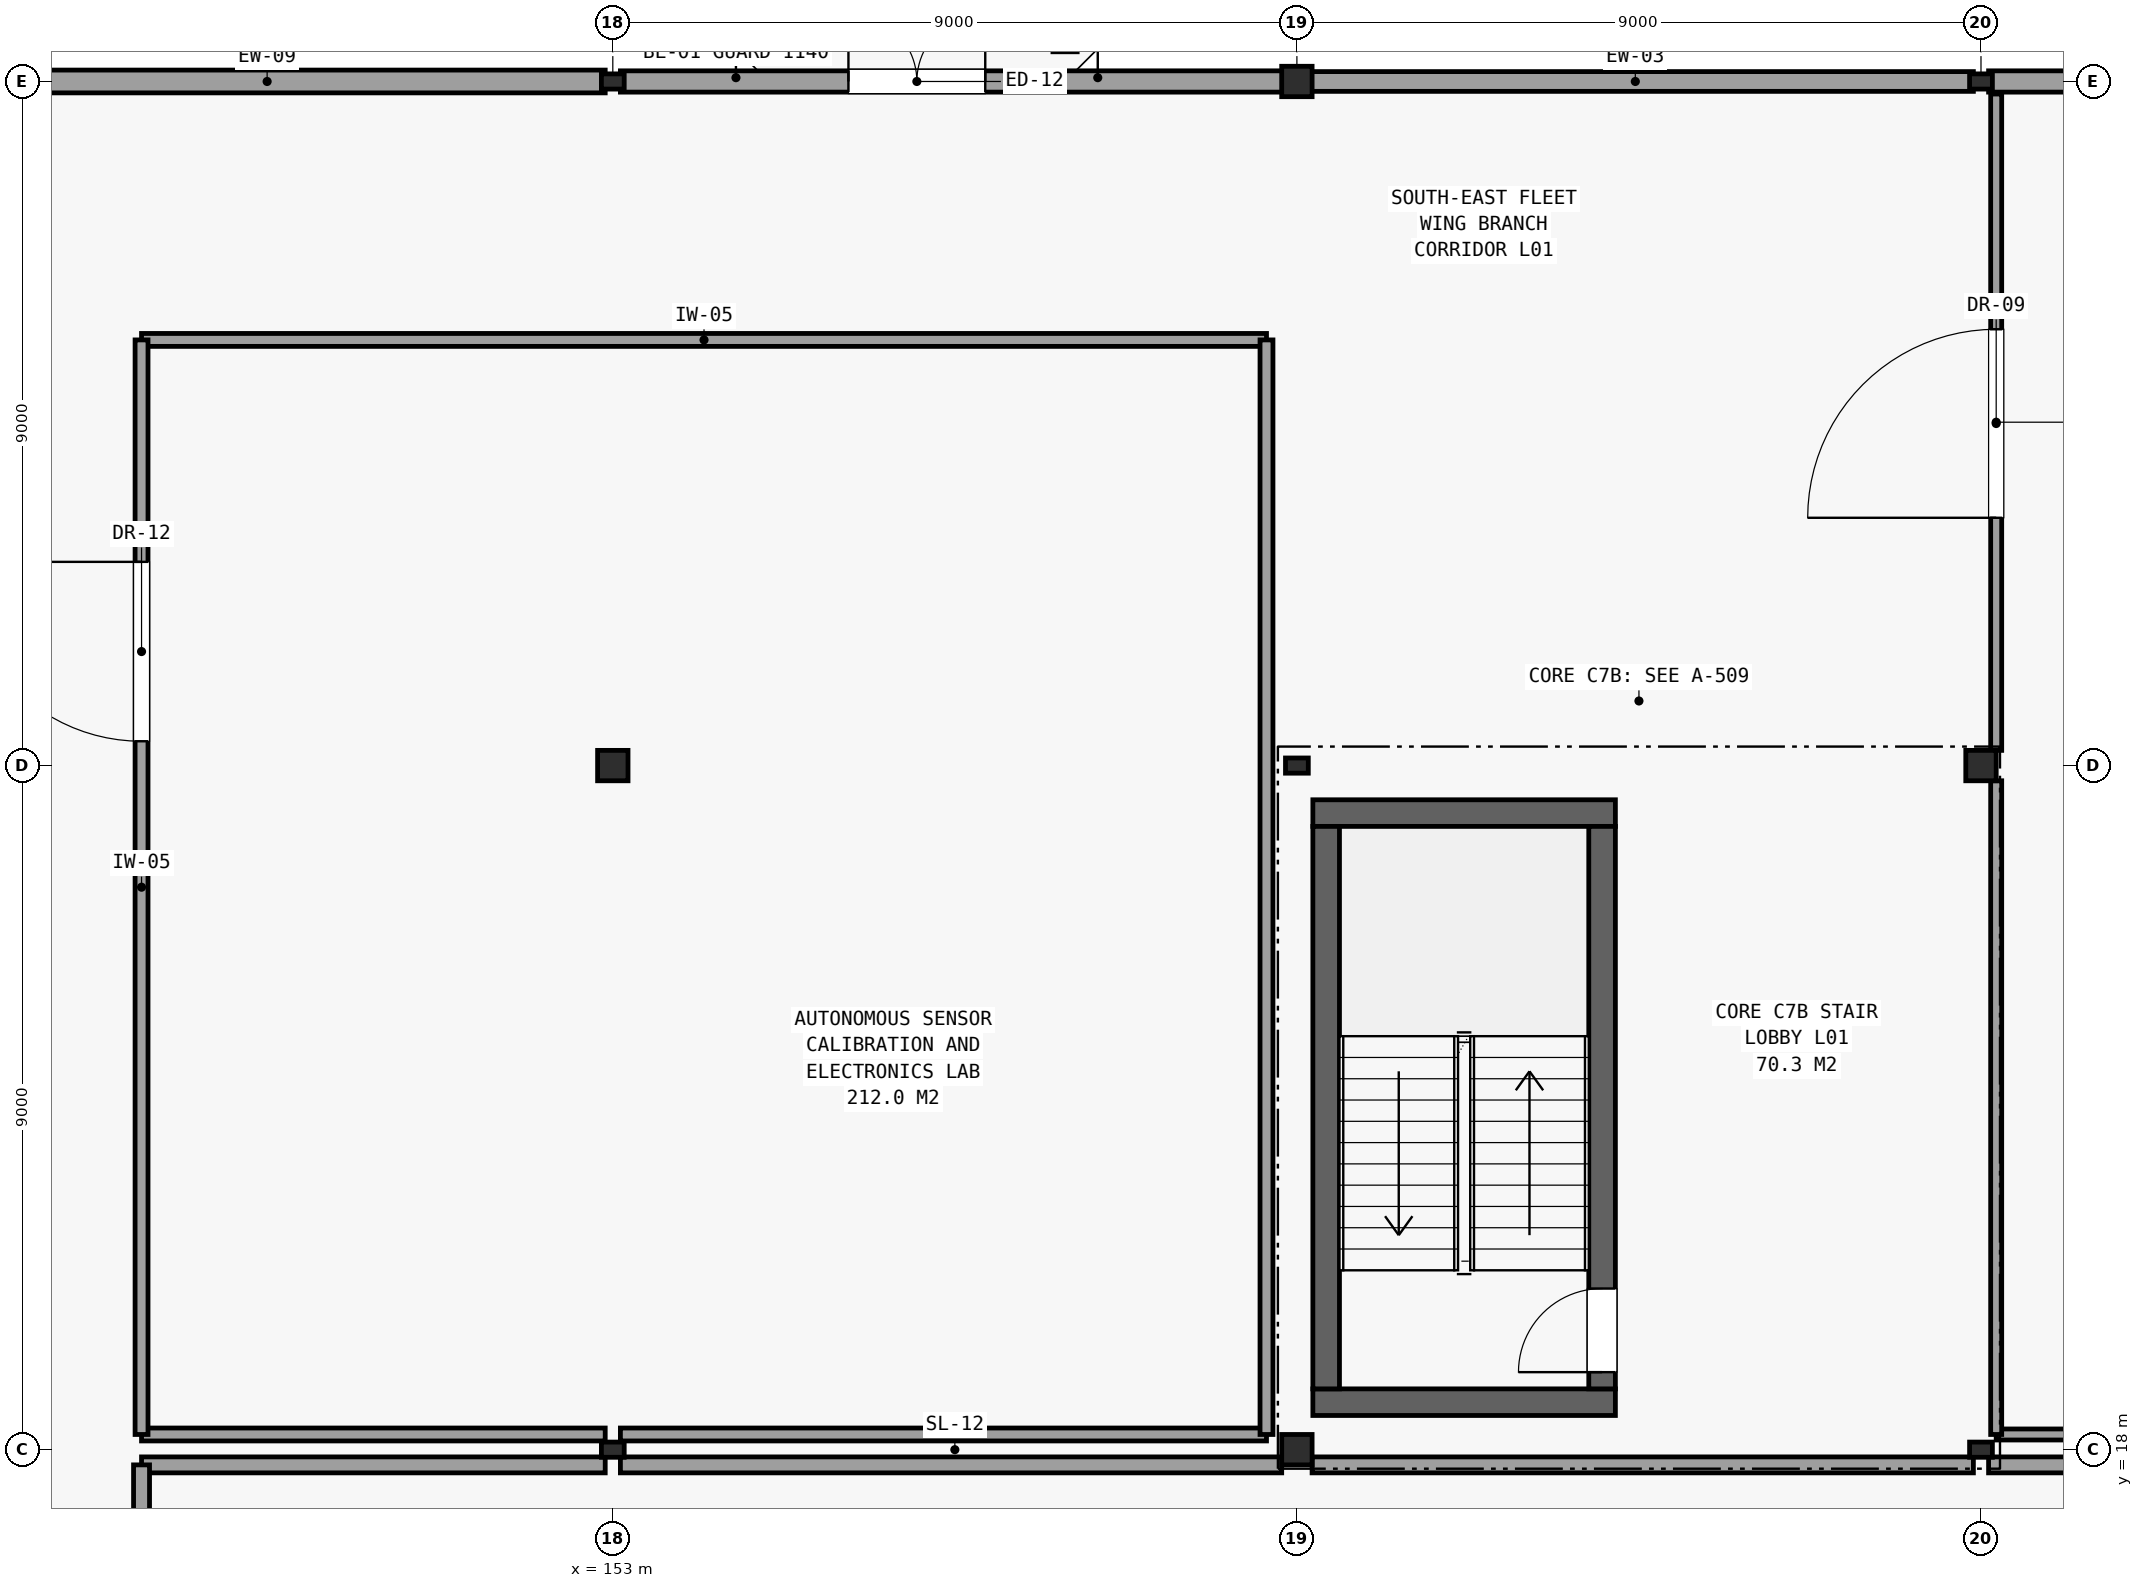
"""IFC4 building model, lengths in metres.
Left out: names, types, materials, properties, quantities, classifications, styles, units other than length and angle.
Written with IfcOpenShell. Run it as: python <this file> out.ifc"""

import sys

from ifc_helpers import new_model, si_unit, direction, frame, frame_2d, origin, origin_2d, place, context, subcontext, project, spatial, rectangle, hollow_rectangle, i_section, extrude, element, fill, save


model = new_model("IFC4")
c1 = context("Model", 3, precision=1e-05, world=origin(), true_north=direction((0.0, 1.0)))
c2 = subcontext(c1, "Body", "Model", "MODEL_VIEW")
j1 = project(units=[si_unit("LENGTHUNIT", "METRE"), si_unit("PLANEANGLEUNIT", "RADIAN")], contexts=[c1])
p1 = place(None, origin())
s1 = spatial("IfcSite", under=j1, at=p1, CompositionType="ELEMENT")
p2 = place(p1, origin())
s2 = spatial("IfcBuilding", under=s1, at=p2, CompositionType="ELEMENT")
p3 = place(p2, frame((0.0, 0.0, 5.1)))
s3 = spatial("IfcBuildingStorey", under=s2, at=p3, CompositionType="ELEMENT", Elevation=5.1)
p4 = place(p3, frame((153.0, 18.0, 0.0), z_axis=(0.0, 0.0, 1.0), x_axis=(1.0, 0.0, 0.0)))
e1 = element("IfcColumn", 1, at=p4, inside=s3, PredefinedType="COLUMN", context=c2, shape_type="SweptSolid", body=[
    extrude(hollow_rectangle(XDim=0.2, YDim=0.3, WallThickness=0.012, at=origin_2d()), origin(), (0.0, 0.0, 1.0), 4.2),
])
p5 = place(p3, frame((153.0, 27.0, 0.0), z_axis=(0.0, 0.0, 1.0), x_axis=(1.0, 0.0, 0.0)))
e2 = element("IfcColumn", 2, at=p5, inside=s3, PredefinedType="COLUMN", context=c2, shape_type="SweptSolid", body=[
    extrude(i_section(OverallWidth=0.4, OverallDepth=0.4, WebThickness=0.013, FlangeThickness=0.021, FilletRadius=0.016, at=origin_2d()), origin(), (0.0, 0.0, 1.0), 4.2),
])
p6 = place(p3, frame((153.0, 36.0, 0.0), z_axis=(0.0, 0.0, 1.0), x_axis=(1.0, 0.0, 0.0)))
e3 = element("IfcColumn", 3, at=p6, inside=s3, PredefinedType="COLUMN", context=c2, shape_type="SweptSolid", body=[
    extrude(hollow_rectangle(XDim=0.2, YDim=0.3, WallThickness=0.012, at=origin_2d()), origin(), (0.0, 0.0, 1.0), 4.2),
])
p7 = place(p3, frame((162.0, 18.0, 0.0), z_axis=(0.0, 0.0, 1.0), x_axis=(1.0, 0.0, 0.0)))
e4 = element("IfcColumn", 4, at=p7, inside=s3, PredefinedType="COLUMN", context=c2, shape_type="SweptSolid", body=[
    extrude(i_section(OverallWidth=0.4, OverallDepth=0.4, WebThickness=0.013, FlangeThickness=0.021, FilletRadius=0.016, at=origin_2d()), origin(), (0.0, 0.0, 1.0), 4.2),
])
p8 = place(p3, frame((162.0, 27.0, 0.0), z_axis=(0.0, 0.0, 1.0), x_axis=(1.0, 0.0, 0.0)))
e5 = element("IfcColumn", 5, at=p8, inside=s3, PredefinedType="COLUMN", context=c2, shape_type="SweptSolid", body=[
    extrude(hollow_rectangle(XDim=0.2, YDim=0.3, WallThickness=0.012, at=origin_2d()), origin(), (0.0, 0.0, 1.0), 4.2),
])
p9 = place(p3, frame((162.0, 36.0, 0.0), z_axis=(0.0, 0.0, 1.0), x_axis=(1.0, 0.0, 0.0)))
e6 = element("IfcColumn", 6, at=p9, inside=s3, PredefinedType="COLUMN", context=c2, shape_type="SweptSolid", body=[
    extrude(i_section(OverallWidth=0.4, OverallDepth=0.4, WebThickness=0.013, FlangeThickness=0.021, FilletRadius=0.016, at=origin_2d()), origin(), (0.0, 0.0, 1.0), 4.2),
])
p10 = place(p3, frame((171.0, 18.0, 0.0), z_axis=(0.0, 0.0, 1.0), x_axis=(1.0, 0.0, 0.0)))
e7 = element("IfcColumn", 7, at=p10, inside=s3, PredefinedType="COLUMN", context=c2, shape_type="SweptSolid", body=[
    extrude(hollow_rectangle(XDim=0.2, YDim=0.3, WallThickness=0.012, at=origin_2d()), origin(), (0.0, 0.0, 1.0), 4.2),
])
p11 = place(p3, frame((171.0, 27.0, 0.0), z_axis=(0.0, 0.0, 1.0), x_axis=(1.0, 0.0, 0.0)))
e8 = element("IfcColumn", 8, at=p11, inside=s3, PredefinedType="COLUMN", context=c2, shape_type="SweptSolid", body=[
    extrude(i_section(OverallWidth=0.4, OverallDepth=0.4, WebThickness=0.013, FlangeThickness=0.021, FilletRadius=0.016, at=origin_2d()), origin(), (0.0, 0.0, 1.0), 4.2),
])
p12 = place(p3, frame((171.0, 36.0, 0.0), z_axis=(0.0, 0.0, 1.0), x_axis=(1.0, 0.0, 0.0)))
e9 = element("IfcColumn", 9, at=p12, inside=s3, PredefinedType="COLUMN", context=c2, shape_type="SweptSolid", body=[
    extrude(hollow_rectangle(XDim=0.2, YDim=0.3, WallThickness=0.012, at=origin_2d()), origin(), (0.0, 0.0, 1.0), 4.2),
])
p13 = place(p3, frame((179.9, 36.0, 0.0), z_axis=(0.0, 0.0, 1.0), x_axis=(-1.0, 0.0, 0.0)))
e10 = element("IfcWall", 10, at=p13, inside=s3, PredefinedType="SOLIDWALL", context=c2, shape_type="SweptSolid", body=[
    extrude(rectangle(XDim=8.8, YDim=0.28, at=frame_2d((4.4, 0.0))), origin(), (0.0, 0.0, 1.0), 3.3),
])
p14 = place(p3, frame((170.9, 36.0, 0.0), z_axis=(0.0, 0.0, 1.0), x_axis=(-1.0, 0.0, 0.0)))
e11 = element("IfcWall", 11, at=p14, inside=s3, PredefinedType="SOLIDWALL", context=c2, shape_type="SweptSolid", body=[
    extrude(rectangle(XDim=8.896, YDim=0.26, at=frame_2d((4.448, 0.0))), origin(), (0.0, 0.0, 1.0), 3.3),
])
p15 = place(p3, frame((161.996, 36.0, 0.0), z_axis=(0.0, 0.0, 1.0), x_axis=(-1.0, 0.0, 0.0)))
e12 = element("IfcWall", 12, at=p15, inside=s3, PredefinedType="SOLIDWALL", context=c2, shape_type="SweptSolid", body=[
    extrude(rectangle(XDim=8.896, YDim=0.28, at=frame_2d((4.448, 0.0))), origin(), (0.0, 0.0, 1.0), 3.3),
])
p16 = place(p15, frame((5.896, 0.0, 0.0), z_axis=(0.0, 0.0, 1.0), x_axis=(-1.0, 0.0, 0.0)))
e13 = element("IfcOpeningElement", 13, at=p16, cuts=e12, PredefinedType="OPENING", context=c2, shape_type="SweptSolid", body=[
    extrude(rectangle(XDim=1.8, YDim=2.2, at=frame_2d((0.9, 1.1))), frame((0.0, 0.151, 0.0), z_axis=(0.0, -1.0, 0.0), x_axis=(1.0, 0.0, 0.0)), (0.0, 0.0, 1.0), 0.302),
])
p17 = place(p3, frame((152.9, 36.0, 0.0), z_axis=(0.0, 0.0, 1.0), x_axis=(-1.0, 0.0, 0.0)))
e14 = element("IfcWall", 14, at=p17, inside=s3, PredefinedType="SOLIDWALL", context=c2, shape_type="SweptSolid", body=[
    extrude(rectangle(XDim=8.896, YDim=0.3, at=frame_2d((4.448, 0.0))), origin(), (0.0, 0.0, 1.0), 3.3),
])
for number, where, z_axis, x_axis in (
    (15, (162.21, 18.625, 0.0), (0.0, 0.0, 1.0), (1.0, 0.0, 0.0)),
    (16, (162.21, 26.375, 0.0), (0.0, 0.0, 1.0), (1.0, 0.0, 0.0)),
):
    element("IfcWall", number, at=place(p3, frame(where, z_axis=z_axis, x_axis=x_axis)), inside=s3, PredefinedType="SHEAR", context=c2, shape_type="SweptSolid", body=[
        extrude(rectangle(XDim=3.98, YDim=0.35, at=frame_2d((1.99, 0.0))), origin(), (0.0, 0.0, 1.0), 3.95),
    ])
p18 = place(p3, frame((162.385, 18.8, 0.0), z_axis=(0.0, 0.0, 1.0), x_axis=(0.0, 1.0, 0.0)))
e17 = element("IfcWall", 17, at=p18, inside=s3, PredefinedType="SHEAR", context=c2, shape_type="SweptSolid", body=[
    extrude(rectangle(XDim=7.4, YDim=0.35, at=frame_2d((3.7, 0.0))), origin(), (0.0, 0.0, 1.0), 3.95),
])
p19 = place(p3, frame((166.015, 18.8, 0.0), z_axis=(0.0, 0.0, 1.0), x_axis=(0.0, 1.0, 0.0)))
e18 = element("IfcWall", 18, at=p19, inside=s3, PredefinedType="SHEAR", context=c2, shape_type="SweptSolid", body=[
    extrude(rectangle(XDim=7.4, YDim=0.35, at=frame_2d((3.7, 0.0))), origin(), (0.0, 0.0, 1.0), 3.95),
])
p20 = place(p19, frame((0.22, 0.0, 0.0)))
e19 = element("IfcOpeningElement", 19, at=p20, cuts=e18, PredefinedType="OPENING", context=c2, shape_type="SweptSolid", body=[
    extrude(rectangle(XDim=1.1, YDim=2.15, at=frame_2d((0.55, 1.075))), frame((0.0, 0.186, 0.0), z_axis=(0.0, -1.0, 0.0), x_axis=(1.0, 0.0, 0.0)), (0.0, 0.0, 1.0), 0.372),
])
p21 = place(p3, frame((146.8, 18.2, 0.0), z_axis=(0.0, 0.0, 1.0), x_axis=(1.0, 0.0, 0.0)))
e20 = element("IfcWall", 20, at=p21, inside=s3, PredefinedType="PARTITIONING", context=c2, shape_type="SweptSolid", body=[
    extrude(rectangle(XDim=6.1, YDim=0.17, at=frame_2d((3.05, 0.0))), origin(), (0.0, 0.0, 1.0), 3.3),
])
p22 = place(p3, frame((153.1, 18.2, 0.0), z_axis=(0.0, 0.0, 1.0), x_axis=(1.0, 0.0, 0.0)))
e21 = element("IfcWall", 21, at=p22, inside=s3, PredefinedType="PARTITIONING", context=c2, shape_type="SweptSolid", body=[
    extrude(rectangle(XDim=8.5, YDim=0.17, at=frame_2d((4.25, 0.0))), origin(), (0.0, 0.0, 1.0), 3.3),
])
p23 = place(p3, frame((146.8, 32.6, 0.0), z_axis=(0.0, 0.0, 1.0), x_axis=(1.0, 0.0, 0.0)))
e22 = element("IfcWall", 22, at=p23, inside=s3, PredefinedType="PARTITIONING", context=c2, shape_type="SweptSolid", body=[
    extrude(rectangle(XDim=14.8, YDim=0.17, at=frame_2d((7.4, 0.0))), origin(), (0.0, 0.0, 1.0), 3.3),
])
p24 = place(p3, frame((146.8, 18.2, 0.0), z_axis=(0.0, 0.0, 1.0), x_axis=(0.0, 1.0, 0.0)))
e23 = element("IfcWall", 23, at=p24, inside=s3, PredefinedType="PARTITIONING", context=c2, shape_type="SweptSolid", body=[
    extrude(rectangle(XDim=14.4, YDim=0.17, at=frame_2d((7.2, 0.0))), origin(), (0.0, 0.0, 1.0), 3.35),
])
p25 = place(p24, frame((9.12, 0.0, 0.0)))
e24 = element("IfcOpeningElement", 24, at=p25, cuts=e23, PredefinedType="OPENING", context=c2, shape_type="SweptSolid", body=[
    extrude(rectangle(XDim=2.36, YDim=2.879, at=frame_2d((1.18, 1.439))), frame((0.0, 0.096, 0.0), z_axis=(0.0, -1.0, 0.0), x_axis=(1.0, 0.0, 0.0)), (0.0, 0.0, 1.0), 0.192),
])
p26 = place(p3, frame((161.6, 18.2, 0.0), z_axis=(0.0, 0.0, 1.0), x_axis=(0.0, 1.0, 0.0)))
e25 = element("IfcWall", 25, at=p26, inside=s3, PredefinedType="PARTITIONING", context=c2, shape_type="SweptSolid", body=[
    extrude(rectangle(XDim=14.4, YDim=0.17, at=frame_2d((7.2, 0.0))), origin(), (0.0, 0.0, 1.0), 3.35),
])
p27 = place(p3, frame((171.2, 18.2, 0.0), z_axis=(0.0, 0.0, 1.0), x_axis=(1.0, 0.0, 0.0)))
e26 = element("IfcWall", 26, at=p27, inside=s3, PredefinedType="PARTITIONING", context=c2, shape_type="SweptSolid", body=[
    extrude(rectangle(XDim=8.635, YDim=0.145, at=frame_2d((4.317, 0.0))), origin(), (0.0, 0.0, 1.0), 3.29),
])
p28 = place(p3, frame((171.2, 18.2, 0.0), z_axis=(0.0, 0.0, 1.0), x_axis=(0.0, 1.0, 0.0)))
e27 = element("IfcWall", 27, at=p28, inside=s3, PredefinedType="PARTITIONING", context=c2, shape_type="SweptSolid", body=[
    extrude(rectangle(XDim=8.6, YDim=0.145, at=frame_2d((4.3, 0.0))), origin(), (0.0, 0.0, 1.0), 3.3),
])
p29 = place(p3, frame((171.2, 27.2, 0.0), z_axis=(0.0, 0.0, 1.0), x_axis=(0.0, 1.0, 0.0)))
e28 = element("IfcWall", 28, at=p29, inside=s3, PredefinedType="PARTITIONING", context=c2, shape_type="SweptSolid", body=[
    extrude(rectangle(XDim=8.635, YDim=0.145, at=frame_2d((4.317, 0.0))), origin(), (0.0, 0.0, 1.0), 3.3),
])
p30 = place(p29, frame((3.06, 0.0, 0.0)))
e29 = element("IfcOpeningElement", 29, at=p30, cuts=e28, PredefinedType="OPENING", context=c2, shape_type="SweptSolid", body=[
    extrude(rectangle(XDim=2.48, YDim=3.026, at=frame_2d((1.24, 1.513))), frame((0.0, 0.083, 0.0), z_axis=(0.0, -1.0, 0.0), x_axis=(1.0, 0.0, 0.0)), (0.0, 0.0, 1.0), 0.167),
])
p31 = place(p3, frame((146.8, 17.8, 0.0), z_axis=(0.0, 0.0, 1.0), x_axis=(1.0, 0.0, 0.0)))
e30 = element("IfcWall", 30, at=p31, inside=s3, PredefinedType="PARTITIONING", context=c2, shape_type="SweptSolid", body=[
    extrude(rectangle(XDim=6.1, YDim=0.21, at=frame_2d((3.05, 0.0))), origin(), (0.0, 0.0, 1.0), 3.29),
])
for number, where, z_axis, x_axis in (
    (31, (153.1, 17.8, 0.0), (0.0, 0.0, 1.0), (1.0, 0.0, 0.0)),
    (32, (162.2, 17.8, 0.0), (0.0, 0.0, 1.0), (1.0, 0.0, 0.0)),
):
    element("IfcWall", number, at=place(p3, frame(where, z_axis=z_axis, x_axis=x_axis)), inside=s3, PredefinedType="PARTITIONING", context=c2, shape_type="SweptSolid", body=[
        extrude(rectangle(XDim=8.7, YDim=0.21, at=frame_2d((4.35, 0.0))), origin(), (0.0, 0.0, 1.0), 3.29),
    ])
p32 = place(p3, frame((171.1, 17.8, 0.0), z_axis=(0.0, 0.0, 1.0), x_axis=(1.0, 0.0, 0.0)))
e33 = element("IfcWall", 33, at=p32, inside=s3, PredefinedType="PARTITIONING", context=c2, shape_type="SweptSolid", body=[
    extrude(rectangle(XDim=8.735, YDim=0.21, at=frame_2d((4.367, 0.0))), origin(), (0.0, 0.0, 1.0), 3.29),
])
p33 = place(p3, frame((146.8, 0.165, 0.0), z_axis=(0.0, 0.0, 1.0), x_axis=(0.0, 1.0, 0.0)))
e34 = element("IfcWall", 34, at=p33, inside=s3, PredefinedType="PARTITIONING", context=c2, shape_type="SweptSolid", body=[
    extrude(rectangle(XDim=17.635, YDim=0.21, at=frame_2d((8.817, 0.0))), origin(), (0.0, 0.0, 1.0), 3.34),
])
p34 = place(p33, frame((12.535, 0.0, 0.0)))
e35 = element("IfcOpeningElement", 35, at=p34, cuts=e34, PredefinedType="OPENING", context=c2, shape_type="SweptSolid", body=[
    extrude(rectangle(XDim=1.6, YDim=2.3, at=frame_2d((0.8, 1.15))), frame((0.0, 0.116, 0.0), z_axis=(0.0, -1.0, 0.0), x_axis=(1.0, 0.0, 0.0)), (0.0, 0.0, 1.0), 0.232),
])
p35 = place(p16, origin())
e36 = element("IfcDoor", 36, at=p35, inside=s3, OperationType="SINGLE_SWING_LEFT", PredefinedType="DOOR", context=c2, shape_type="SweptSolid", body=[
    extrude(rectangle(XDim=1.8, YDim=2.2, at=frame_2d((0.9, 1.1))), frame((0.0, 0.025, 0.0), z_axis=(0.0, -1.0, 0.0), x_axis=(1.0, 0.0, 0.0)), (0.0, 0.0, 1.0), 0.05),
])
fill(e13, e36)
p36 = place(p20, origin())
e37 = element("IfcDoor", 37, at=p36, inside=s3, OperationType="SINGLE_SWING_LEFT", PredefinedType="DOOR", context=c2, shape_type="SweptSolid", body=[
    extrude(rectangle(XDim=1.1, YDim=2.15, at=frame_2d((0.55, 1.075))), frame((0.0, 0.025, 0.0), z_axis=(0.0, -1.0, 0.0), x_axis=(1.0, 0.0, 0.0)), (0.0, 0.0, 1.0), 0.05),
])
fill(e19, e37)
p37 = place(p25, origin())
e38 = element("IfcDoor", 38, at=p37, inside=s3, OperationType="SINGLE_SWING_RIGHT", PredefinedType="DOOR", context=c2, shape_type="SweptSolid", body=[
    extrude(rectangle(XDim=2.36, YDim=2.879, at=frame_2d((1.18, 1.439))), frame((0.0, 0.025, 0.0), z_axis=(0.0, -1.0, 0.0), x_axis=(1.0, 0.0, 0.0)), (0.0, 0.0, 1.0), 0.05),
])
fill(e24, e38)
p38 = place(p30, origin())
e39 = element("IfcDoor", 39, at=p38, inside=s3, OperationType="SINGLE_SWING_LEFT", PredefinedType="DOOR", context=c2, shape_type="SweptSolid", body=[
    extrude(rectangle(XDim=2.48, YDim=3.026, at=frame_2d((1.24, 1.513))), frame((0.0, 0.025, 0.0), z_axis=(0.0, -1.0, 0.0), x_axis=(1.0, 0.0, 0.0)), (0.0, 0.0, 1.0), 0.05),
])
fill(e29, e39)
save(model, sys.argv[1])
